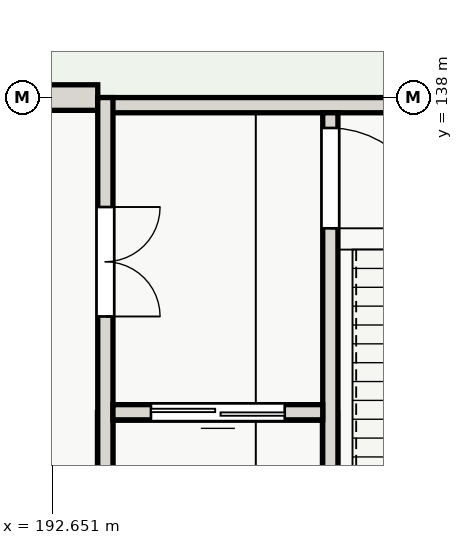
"""IFC4 building model, lengths in metres.
Left out: names, types, materials, properties, quantities, classifications, styles, units other than length and angle.
Written with IfcOpenShell. Run it as: python <this file> out.ifc"""

import sys

from ifc_helpers import new_model, si_unit, direction, frame, frame_2d, origin, place, context, subcontext, project, spatial, rectangle, extrude, element, fill, save


model = new_model("IFC4")
c1 = context("Model", 3, precision=1e-05, world=origin(), true_north=direction((0.0, 1.0)))
c2 = subcontext(c1, "Body", "Model", "MODEL_VIEW")
j1 = project(units=[si_unit("LENGTHUNIT", "METRE"), si_unit("PLANEANGLEUNIT", "RADIAN")], contexts=[c1])
p1 = place(None, origin())
s1 = spatial("IfcSite", under=j1, at=p1, CompositionType="ELEMENT")
p2 = place(p1, origin())
s2 = spatial("IfcBuilding", under=s1, at=p2, CompositionType="ELEMENT")
p3 = place(p2, origin())
s3 = spatial("IfcBuildingStorey", under=s2, at=p3, CompositionType="ELEMENT", Elevation=0.0)
p4 = place(p3, frame((192.0, 138.0, 0.0), z_axis=(0.0, 0.0, 1.0), x_axis=(1.0, 0.0, 0.0)))
e1 = element("IfcWall", 1, at=p4, inside=s3, PredefinedType="SOLIDWALL", context=c2, shape_type="SweptSolid", body=[
    extrude(rectangle(XDim=1.4, YDim=0.42, at=frame_2d((0.7, 0.0))), origin(), (0.0, 0.0, 1.0), 3.58),
])
p5 = place(p3, frame((197.22, 132.82, -1.6), z_axis=(0.0, 0.0, 1.0), x_axis=(-1.0, 0.0, 0.0)))
e2 = element("IfcWall", 2, at=p5, inside=s3, PredefinedType="SHEAR", context=c2, shape_type="SweptSolid", body=[
    extrude(rectangle(XDim=3.7, YDim=0.25, at=frame_2d((1.85, 0.0))), origin(), (0.0, 0.0, 1.0), 1.6),
])
for number, where, z_axis, x_axis in (
    (3, (193.52, 132.82, -1.6), (0.0, 0.0, 1.0), (0.0, -1.0, 0.0)),
    (4, (197.22, 128.92, -1.6), (0.0, 0.0, 1.0), (0.0, 1.0, 0.0)),
):
    element("IfcWall", number, at=place(p3, frame(where, z_axis=z_axis, x_axis=x_axis)), inside=s3, PredefinedType="SHEAR", context=c2, shape_type="SweptSolid", body=[
        extrude(rectangle(XDim=3.9, YDim=0.25, at=frame_2d((1.95, 0.0))), origin(), (0.0, 0.0, 1.0), 1.6),
    ])
p6 = place(p3, frame((193.4, 137.875, 0.0), z_axis=(0.0, 0.0, 1.0), x_axis=(1.0, 0.0, 0.0)))
e5 = element("IfcWall", 5, at=p6, inside=s3, PredefinedType="SHEAR", context=c2, shape_type="SweptSolid", body=[
    extrude(rectangle(XDim=9.2, YDim=0.25, at=frame_2d((4.6, 0.0))), origin(), (0.0, 0.0, 1.0), 4.2),
])
p7 = place(p6, frame((5.9, 0.0, 0.0)))
e6 = element("IfcOpeningElement", 6, at=p7, cuts=e5, PredefinedType="OPENING", context=c2, shape_type="SweptSolid", body=[
    extrude(rectangle(XDim=1.9, YDim=2.2, at=frame_2d((0.95, 1.1))), frame((0.0, 0.135, 0.0), z_axis=(0.0, -1.0, 0.0), x_axis=(1.0, 0.0, 0.0)), (0.0, 0.0, 1.0), 0.27),
])
p8 = place(p3, frame((193.525, 138.0, 0.0), z_axis=(0.0, 0.0, 1.0), x_axis=(0.0, -1.0, 0.0)))
e7 = element("IfcWall", 7, at=p8, inside=s3, PredefinedType="SHEAR", context=c2, shape_type="SweptSolid", body=[
    extrude(rectangle(XDim=9.2, YDim=0.25, at=frame_2d((4.6, 0.0))), origin(), (0.0, 0.0, 1.0), 4.2),
])
p9 = place(p8, frame((1.8, 0.0, 0.0)))
e8 = element("IfcOpeningElement", 8, at=p9, cuts=e7, PredefinedType="OPENING", context=c2, shape_type="SweptSolid", body=[
    extrude(rectangle(XDim=1.8, YDim=2.15, at=frame_2d((0.9, 1.075))), frame((0.0, 0.135, 0.0), z_axis=(0.0, -1.0, 0.0), x_axis=(1.0, 0.0, 0.0)), (0.0, 0.0, 1.0), 0.27),
])
p10 = place(p3, frame((197.225, 137.75, 0.0), z_axis=(0.0, 0.0, 1.0), x_axis=(0.0, -1.0, 0.0)))
e9 = element("IfcWall", 9, at=p10, inside=s3, PredefinedType="SHEAR", context=c2, shape_type="SweptSolid", body=[
    extrude(rectangle(XDim=8.7, YDim=0.25, at=frame_2d((4.35, 0.0))), origin(), (0.0, 0.0, 1.0), 4.2),
])
p11 = place(p10, frame((0.25, 0.0, 0.0)))
e10 = element("IfcOpeningElement", 10, at=p11, cuts=e9, PredefinedType="OPENING", context=c2, shape_type="SweptSolid", body=[
    extrude(rectangle(XDim=1.65, YDim=2.1, at=frame_2d((0.825, 1.05))), frame((0.0, 0.135, 0.0), z_axis=(0.0, -1.0, 0.0), x_axis=(1.0, 0.0, 0.0)), (0.0, 0.0, 1.0), 0.27),
])
p12 = place(p3, frame((197.1, 132.825, 0.0), z_axis=(0.0, 0.0, 1.0), x_axis=(-1.0, 0.0, 0.0)))
e11 = element("IfcWall", 11, at=p12, inside=s3, PredefinedType="SHEAR", context=c2, shape_type="SweptSolid", body=[
    extrude(rectangle(XDim=3.45, YDim=0.25, at=frame_2d((1.725, 0.0))), origin(), (0.0, 0.0, 1.0), 4.2),
])
p13 = place(p12, frame((0.625, 0.0, 0.0)))
e12 = element("IfcOpeningElement", 12, at=p13, cuts=e11, PredefinedType="OPENING", context=c2, shape_type="SweptSolid", body=[
    extrude(rectangle(XDim=2.2, YDim=2.35, at=frame_2d((1.1, 1.175))), frame((0.0, 0.135, 0.0), z_axis=(0.0, -1.0, 0.0), x_axis=(1.0, 0.0, 0.0)), (0.0, 0.0, 1.0), 0.27),
])
p14 = place(p9, origin())
e13 = element("IfcDoor", 13, at=p14, inside=s3, OperationType="DOUBLE_DOOR_SINGLE_SWING", PredefinedType="DOOR", context=c2, shape_type="SweptSolid", body=[
    extrude(rectangle(XDim=1.8, YDim=2.15, at=frame_2d((0.9, 1.075))), frame((0.0, 0.025, 0.0), z_axis=(0.0, -1.0, 0.0), x_axis=(1.0, 0.0, 0.0)), (0.0, 0.0, 1.0), 0.05),
])
fill(e8, e13)
p15 = place(p11, origin())
e14 = element("IfcDoor", 14, at=p15, inside=s3, OperationType="SINGLE_SWING_RIGHT", PredefinedType="DOOR", context=c2, shape_type="SweptSolid", body=[
    extrude(rectangle(XDim=1.65, YDim=2.1, at=frame_2d((0.825, 1.05))), frame((0.0, 0.025, 0.0), z_axis=(0.0, -1.0, 0.0), x_axis=(1.0, 0.0, 0.0)), (0.0, 0.0, 1.0), 0.05),
])
fill(e10, e14)
p16 = place(p13, origin())
e15 = element("IfcDoor", 15, at=p16, inside=s3, OperationType="SLIDING_TO_RIGHT", PredefinedType="DOOR", context=c2, shape_type="SweptSolid", body=[
    extrude(rectangle(XDim=2.2, YDim=2.35, at=frame_2d((1.1, 1.175))), frame((0.0, 0.025, 0.0), z_axis=(0.0, -1.0, 0.0), x_axis=(1.0, 0.0, 0.0)), (0.0, 0.0, 1.0), 0.05),
])
fill(e12, e15)
save(model, sys.argv[1])
